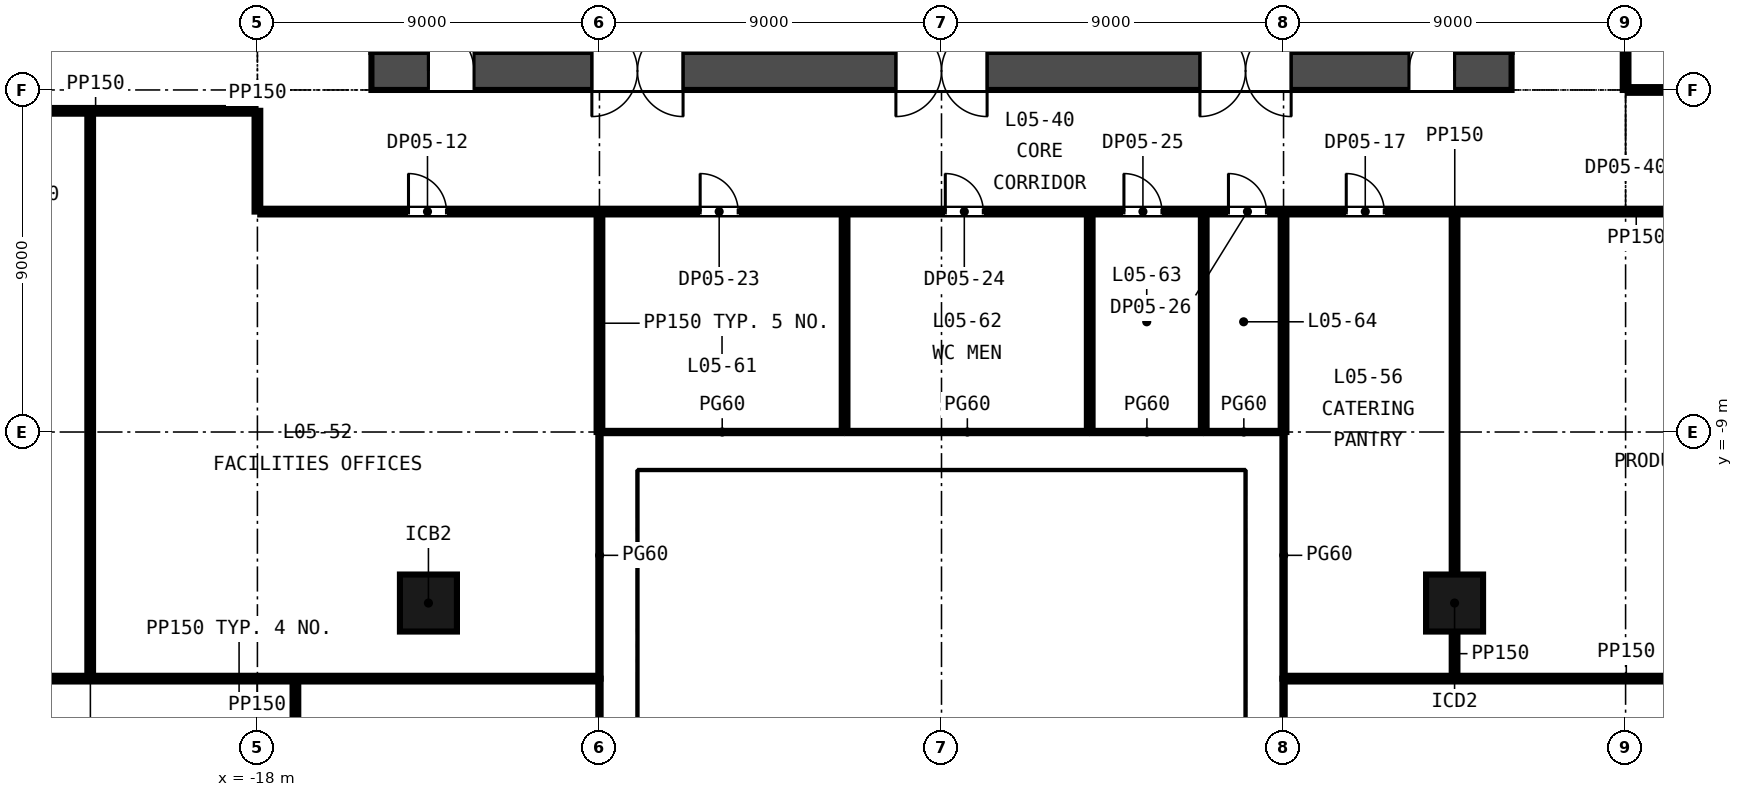
"""IFC4 building model, lengths in metres.
Left out: names, types, materials, properties, quantities, classifications, styles, units other than length and angle.
Written with IfcOpenShell. Run it as: python <this file> out.ifc"""

import sys

from ifc_helpers import new_model, si_unit, direction, frame, frame_2d, origin, origin_2d, place, context, subcontext, project, spatial, rectangle, extrude, element, fill, save


model = new_model("IFC4")
c1 = context("Model", 3, precision=1e-05, world=origin(), true_north=direction((0.0, 1.0)))
c2 = subcontext(c1, "Body", "Model", "MODEL_VIEW")
j1 = project(units=[si_unit("LENGTHUNIT", "METRE"), si_unit("PLANEANGLEUNIT", "RADIAN")], contexts=[c1])
p1 = place(None, origin())
s1 = spatial("IfcSite", under=j1, at=p1, CompositionType="ELEMENT")
p2 = place(p1, origin())
s2 = spatial("IfcBuilding", under=s1, at=p2, CompositionType="ELEMENT")
p3 = place(p2, frame((0.0, 0.0, 31.5)))
s3 = spatial("IfcBuildingStorey", under=s2, at=p3, CompositionType="ELEMENT", Elevation=31.5)
p4 = place(p3, frame((-15.0, 0.5, -0.3), z_axis=(0.0, 0.0, 1.0), x_axis=(1.0, 0.0, 0.0)))
e1 = element("IfcWall", 1, at=p4, inside=s3, PredefinedType="SOLIDWALL", context=c2, shape_type="SweptSolid", body=[
    extrude(rectangle(XDim=30.0, YDim=1.0, at=frame_2d((15.0, 0.0))), origin(), (0.0, 0.0, 1.0), 4.65),
])
p5 = place(p4, frame((5.8, 0.0, 0.3)))
e2 = element("IfcOpeningElement", 2, at=p5, cuts=e1, PredefinedType="OPENING", context=c2, shape_type="SweptSolid", body=[
    extrude(rectangle(XDim=2.4, YDim=2.4, at=frame_2d((1.2, 1.2))), frame((0.0, 0.51, 0.0), z_axis=(0.0, -1.0, 0.0), x_axis=(1.0, 0.0, 0.0)), (0.0, 0.0, 1.0), 1.02),
])
p6 = place(p4, frame((13.8, 0.0, 0.3)))
e3 = element("IfcOpeningElement", 3, at=p6, cuts=e1, PredefinedType="OPENING", context=c2, shape_type="SweptSolid", body=[
    extrude(rectangle(XDim=2.4, YDim=2.4, at=frame_2d((1.2, 1.2))), frame((0.0, 0.51, 0.0), z_axis=(0.0, -1.0, 0.0), x_axis=(1.0, 0.0, 0.0)), (0.0, 0.0, 1.0), 1.02),
])
p7 = place(p4, frame((21.8, 0.0, 0.3)))
e4 = element("IfcOpeningElement", 4, at=p7, cuts=e1, PredefinedType="OPENING", context=c2, shape_type="SweptSolid", body=[
    extrude(rectangle(XDim=2.4, YDim=2.4, at=frame_2d((1.2, 1.2))), frame((0.0, 0.51, 0.0), z_axis=(0.0, -1.0, 0.0), x_axis=(1.0, 0.0, 0.0)), (0.0, 0.0, 1.0), 1.02),
])
p8 = place(p4, frame((1.5, 0.0, 0.3)))
e5 = element("IfcOpeningElement", 5, at=p8, cuts=e1, PredefinedType="OPENING", context=c2, shape_type="SweptSolid", body=[
    extrude(rectangle(XDim=1.2, YDim=2.1, at=frame_2d((0.6, 1.05))), frame((0.0, 0.51, 0.0), z_axis=(0.0, -1.0, 0.0), x_axis=(1.0, 0.0, 0.0)), (0.0, 0.0, 1.0), 1.02),
])
p9 = place(p4, frame((27.3, 0.0, 0.3)))
e6 = element("IfcOpeningElement", 6, at=p9, cuts=e1, PredefinedType="OPENING", context=c2, shape_type="SweptSolid", body=[
    extrude(rectangle(XDim=1.2, YDim=2.1, at=frame_2d((0.6, 1.05))), frame((0.0, 0.51, 0.0), z_axis=(0.0, -1.0, 0.0), x_axis=(1.0, 0.0, 0.0)), (0.0, 0.0, 1.0), 1.02),
])
for number, where, z_axis, x_axis in (
    (7, (-13.5, -13.5, -0.3), (0.0, 0.0, 1.0), (1.0, 0.0, 0.0)),
    (8, (13.5, -13.5, -0.3), (0.0, 0.0, 1.0), (1.0, 0.0, 0.0)),
):
    element("IfcColumn", number, at=place(p3, frame(where, z_axis=z_axis, x_axis=x_axis)), inside=s3, PredefinedType="COLUMN", context=c2, shape_type="SweptSolid", body=[
        extrude(rectangle(XDim=1.5, YDim=1.5, at=origin_2d()), origin(), (0.0, 0.0, 1.0), 4.65),
    ])
for number, where, z_axis, x_axis in (
    (9, (-26.998, -15.489, 0.0), (0.0, 0.0, 1.0), (1.0, 0.0, 0.0)),
    (10, (9.03, -15.489, 0.0), (0.0, 0.0, 1.0), (1.0, 0.0, 0.0)),
):
    element("IfcWall", number, at=place(p3, frame(where, z_axis=z_axis, x_axis=x_axis)), inside=s3, PredefinedType="PARTITIONING", context=c2, shape_type="SweptSolid", body=[
        extrude(rectangle(XDim=17.968, YDim=0.15, at=frame_2d((8.984, 0.0))), origin(), (0.0, 0.0, 1.0), 4.35),
    ])
for number, where, z_axis, x_axis in (
    (11, (-8.925, -9.0, 0.0), (0.0, 0.0, 1.0), (1.0, 0.0, 0.0)),
    (12, (-2.475, -9.0, 0.0), (0.0, 0.0, 1.0), (1.0, 0.0, 0.0)),
):
    element("IfcWall", number, at=place(p3, frame(where, z_axis=z_axis, x_axis=x_axis)), inside=s3, PredefinedType="PARTITIONING", context=c2, shape_type="SweptSolid", body=[
        extrude(rectangle(XDim=6.3, YDim=0.06, at=frame_2d((3.15, 0.0))), origin(), (0.0, 0.0, 1.0), 4.35),
    ])
p10 = place(p3, frame((3.975, -9.0, 0.0), z_axis=(0.0, 0.0, 1.0), x_axis=(1.0, 0.0, 0.0)))
e13 = element("IfcWall", 13, at=p10, inside=s3, PredefinedType="PARTITIONING", context=c2, shape_type="SweptSolid", body=[
    extrude(rectangle(XDim=2.85, YDim=0.06, at=frame_2d((1.425, 0.0))), origin(), (0.0, 0.0, 1.0), 4.35),
])
p11 = place(p3, frame((6.975, -9.0, 0.0), z_axis=(0.0, 0.0, 1.0), x_axis=(1.0, 0.0, 0.0)))
e14 = element("IfcWall", 14, at=p11, inside=s3, PredefinedType="PARTITIONING", context=c2, shape_type="SweptSolid", body=[
    extrude(rectangle(XDim=1.95, YDim=0.06, at=frame_2d((0.975, 0.0))), origin(), (0.0, 0.0, 1.0), 4.35),
])
p12 = place(p3, frame((-17.925, -3.2, 0.0), z_axis=(0.0, 0.0, 1.0), x_axis=(1.0, 0.0, 0.0)))
e15 = element("IfcWall", 15, at=p12, inside=s3, PredefinedType="PARTITIONING", context=c2, shape_type="SweptSolid", body=[
    extrude(rectangle(XDim=50.906, YDim=0.15, at=frame_2d((25.453, 0.0))), origin(), (0.0, 0.0, 1.0), 4.35),
])
p13 = place(p12, frame((3.9, 0.0, 0.0)))
e16 = element("IfcOpeningElement", 16, at=p13, cuts=e15, PredefinedType="OPENING", context=c2, shape_type="SweptSolid", body=[
    extrude(rectangle(XDim=1.0, YDim=2.1, at=frame_2d((0.5, 1.05))), frame((0.0, 0.085, 0.0), z_axis=(0.0, -1.0, 0.0), x_axis=(1.0, 0.0, 0.0)), (0.0, 0.0, 1.0), 0.17),
])
p14 = place(p12, frame((28.575, 0.0, 0.0)))
e17 = element("IfcOpeningElement", 17, at=p14, cuts=e15, PredefinedType="OPENING", context=c2, shape_type="SweptSolid", body=[
    extrude(rectangle(XDim=1.0, YDim=2.1, at=frame_2d((0.5, 1.05))), frame((0.0, 0.085, 0.0), z_axis=(0.0, -1.0, 0.0), x_axis=(1.0, 0.0, 0.0)), (0.0, 0.0, 1.0), 0.17),
])
p15 = place(p12, frame((42.825, 0.0, 0.0)))
e18 = element("IfcOpeningElement", 18, at=p15, cuts=e15, PredefinedType="OPENING", context=c2, shape_type="SweptSolid", body=[
    extrude(rectangle(XDim=1.0, YDim=2.1, at=frame_2d((0.5, 1.05))), frame((0.0, 0.085, 0.0), z_axis=(0.0, -1.0, 0.0), x_axis=(1.0, 0.0, 0.0)), (0.0, 0.0, 1.0), 0.17),
])
p16 = place(p12, frame((11.575, 0.0, 0.0)))
e19 = element("IfcOpeningElement", 19, at=p16, cuts=e15, PredefinedType="OPENING", context=c2, shape_type="SweptSolid", body=[
    extrude(rectangle(XDim=1.0, YDim=2.1, at=frame_2d((0.5, 1.05))), frame((0.0, 0.085, 0.0), z_axis=(0.0, -1.0, 0.0), x_axis=(1.0, 0.0, 0.0)), (0.0, 0.0, 1.0), 0.17),
])
p17 = place(p12, frame((18.025, 0.0, 0.0)))
e20 = element("IfcOpeningElement", 20, at=p17, cuts=e15, PredefinedType="OPENING", context=c2, shape_type="SweptSolid", body=[
    extrude(rectangle(XDim=1.0, YDim=2.1, at=frame_2d((0.5, 1.05))), frame((0.0, 0.085, 0.0), z_axis=(0.0, -1.0, 0.0), x_axis=(1.0, 0.0, 0.0)), (0.0, 0.0, 1.0), 0.17),
])
p18 = place(p12, frame((22.725, 0.0, 0.0)))
e21 = element("IfcOpeningElement", 21, at=p18, cuts=e15, PredefinedType="OPENING", context=c2, shape_type="SweptSolid", body=[
    extrude(rectangle(XDim=1.0, YDim=2.1, at=frame_2d((0.5, 1.05))), frame((0.0, 0.085, 0.0), z_axis=(0.0, -1.0, 0.0), x_axis=(1.0, 0.0, 0.0)), (0.0, 0.0, 1.0), 0.17),
])
p19 = place(p12, frame((25.475, 0.0, 0.0)))
e22 = element("IfcOpeningElement", 22, at=p19, cuts=e15, PredefinedType="OPENING", context=c2, shape_type="SweptSolid", body=[
    extrude(rectangle(XDim=1.0, YDim=2.1, at=frame_2d((0.5, 1.05))), frame((0.0, 0.085, 0.0), z_axis=(0.0, -1.0, 0.0), x_axis=(1.0, 0.0, 0.0)), (0.0, 0.0, 1.0), 0.17),
])
p20 = place(p3, frame((-31.859, -0.549, 0.0), z_axis=(0.0, 0.0, 1.0), x_axis=(1.0, 0.0, 0.0)))
e23 = element("IfcWall", 23, at=p20, inside=s3, PredefinedType="PARTITIONING", context=c2, shape_type="SweptSolid", body=[
    extrude(rectangle(XDim=13.784, YDim=0.15, at=frame_2d((6.892, 0.0))), origin(), (0.0, 0.0, 1.0), 4.35),
])
p21 = place(p20, frame((4.359, 0.0, 0.0)))
e24 = element("IfcOpeningElement", 24, at=p21, cuts=e23, PredefinedType="OPENING", context=c2, shape_type="SweptSolid", body=[
    extrude(rectangle(XDim=1.0, YDim=2.1, at=frame_2d((0.5, 1.05))), frame((0.0, 0.085, 0.0), z_axis=(0.0, -1.0, 0.0), x_axis=(1.0, 0.0, 0.0)), (0.0, 0.0, 1.0), 0.17),
])
p22 = place(p3, frame((18.075, 0.0, 0.0), z_axis=(0.0, 0.0, 1.0), x_axis=(1.0, 0.0, 0.0)))
e25 = element("IfcWall", 25, at=p22, inside=s3, PredefinedType="PARTITIONING", context=c2, shape_type="SweptSolid", body=[
    extrude(rectangle(XDim=17.865, YDim=0.15, at=frame_2d((8.933, 0.0))), origin(), (0.0, 0.0, 1.0), 4.35),
])
p23 = place(p22, frame((15.325, 0.0, 0.0)))
e26 = element("IfcOpeningElement", 26, at=p23, cuts=e25, PredefinedType="OPENING", context=c2, shape_type="SweptSolid", body=[
    extrude(rectangle(XDim=1.0, YDim=2.1, at=frame_2d((0.5, 1.05))), frame((0.0, 0.085, 0.0), z_axis=(0.0, -1.0, 0.0), x_axis=(1.0, 0.0, 0.0)), (0.0, 0.0, 1.0), 0.17),
])
p24 = place(p3, frame((-22.4, -15.414, 0.0), z_axis=(0.0, 0.0, 1.0), x_axis=(0.0, 1.0, 0.0)))
e27 = element("IfcWall", 27, at=p24, inside=s3, PredefinedType="PARTITIONING", context=c2, shape_type="SweptSolid", body=[
    extrude(rectangle(XDim=14.79, YDim=0.15, at=frame_2d((7.395, 0.0))), origin(), (0.0, 0.0, 1.0), 4.35),
])
p25 = place(p3, frame((-18.0, -3.2, 0.0), z_axis=(0.0, 0.0, 1.0), x_axis=(0.0, 1.0, 0.0)))
e28 = element("IfcWall", 28, at=p25, inside=s3, PredefinedType="PARTITIONING", context=c2, shape_type="SweptSolid", body=[
    extrude(rectangle(XDim=2.651, YDim=0.15, at=frame_2d((1.326, 0.0))), origin(), (0.0, 0.0, 1.0), 4.35),
])
p26 = place(p3, frame((-17.0, -27.704, 0.0), z_axis=(0.0, 0.0, 1.0), x_axis=(0.0, 1.0, 0.0)))
e29 = element("IfcWall", 29, at=p26, inside=s3, PredefinedType="PARTITIONING", context=c2, shape_type="SweptSolid", body=[
    extrude(rectangle(XDim=12.14, YDim=0.15, at=frame_2d((6.07, 0.0))), origin(), (0.0, 0.0, 1.0), 4.35),
])
p27 = place(p3, frame((-9.0, -27.778, 0.0), z_axis=(0.0, 0.0, 1.0), x_axis=(0.0, 1.0, 0.0)))
e30 = element("IfcWall", 30, at=p27, inside=s3, PredefinedType="PARTITIONING", context=c2, shape_type="SweptSolid", body=[
    extrude(rectangle(XDim=12.288, YDim=0.06, at=frame_2d((6.144, 0.0))), origin(), (0.0, 0.0, 1.0), 4.35),
])
p28 = place(p3, frame((-9.0, -15.489, 0.0), z_axis=(0.0, 0.0, 1.0), x_axis=(0.0, 1.0, 0.0)))
e31 = element("IfcWall", 31, at=p28, inside=s3, PredefinedType="PARTITIONING", context=c2, shape_type="SweptSolid", body=[
    extrude(rectangle(XDim=6.488, YDim=0.06, at=frame_2d((3.244, 0.0))), origin(), (0.0, 0.0, 1.0), 4.35),
])
for number, where, z_axis, x_axis in (
    (32, (-9.0, -9.0, 0.0), (0.0, 0.0, 1.0), (0.0, 1.0, 0.0)),
    (33, (-2.55, -9.0, 0.0), (0.0, 0.0, 1.0), (0.0, 1.0, 0.0)),
    (34, (3.9, -9.0, 0.0), (0.0, 0.0, 1.0), (0.0, 1.0, 0.0)),
    (35, (6.9, -9.0, 0.0), (0.0, 0.0, 1.0), (0.0, 1.0, 0.0)),
):
    element("IfcWall", number, at=place(p3, frame(where, z_axis=z_axis, x_axis=x_axis)), inside=s3, PredefinedType="PARTITIONING", context=c2, shape_type="SweptSolid", body=[
        extrude(rectangle(XDim=5.725, YDim=0.15, at=frame_2d((2.863, 0.0))), origin(), (0.0, 0.0, 1.0), 4.35),
    ])
p29 = place(p3, frame((9.0, -23.953, 0.0), z_axis=(0.0, 0.0, 1.0), x_axis=(0.0, 1.0, 0.0)))
e36 = element("IfcWall", 36, at=p29, inside=s3, PredefinedType="PARTITIONING", context=c2, shape_type="SweptSolid", body=[
    extrude(rectangle(XDim=8.462, YDim=0.06, at=frame_2d((4.231, 0.0))), origin(), (0.0, 0.0, 1.0), 4.35),
])
p30 = place(p3, frame((9.0, -15.489, 0.0), z_axis=(0.0, 0.0, 1.0), x_axis=(0.0, 1.0, 0.0)))
e37 = element("IfcWall", 37, at=p30, inside=s3, PredefinedType="PARTITIONING", context=c2, shape_type="SweptSolid", body=[
    extrude(rectangle(XDim=6.488, YDim=0.06, at=frame_2d((3.244, 0.0))), origin(), (0.0, 0.0, 1.0), 4.35),
])
p31 = place(p3, frame((9.0, -9.0, 0.0), z_axis=(0.0, 0.0, 1.0), x_axis=(0.0, 1.0, 0.0)))
e38 = element("IfcWall", 38, at=p31, inside=s3, PredefinedType="PARTITIONING", context=c2, shape_type="SweptSolid", body=[
    extrude(rectangle(XDim=5.725, YDim=0.15, at=frame_2d((2.863, 0.0))), origin(), (0.0, 0.0, 1.0), 4.35),
])
p32 = place(p3, frame((13.5, -15.414, 0.0), z_axis=(0.0, 0.0, 1.0), x_axis=(0.0, 1.0, 0.0)))
e39 = element("IfcWall", 39, at=p32, inside=s3, PredefinedType="PARTITIONING", context=c2, shape_type="SweptSolid", body=[
    extrude(rectangle(XDim=1.164, YDim=0.15, at=frame_2d((0.582, 0.0))), origin(), (0.0, 0.0, 1.0), 3.591),
])
p33 = place(p3, frame((13.5, -12.75, 0.0), z_axis=(0.0, 0.0, 1.0), x_axis=(0.0, 1.0, 0.0)))
e40 = element("IfcWall", 40, at=p33, inside=s3, PredefinedType="PARTITIONING", context=c2, shape_type="SweptSolid", body=[
    extrude(rectangle(XDim=9.475, YDim=0.15, at=frame_2d((4.738, 0.0))), origin(), (0.0, 0.0, 1.0), 3.601),
])
p34 = place(p3, frame((18.0, 0.0, 0.0), z_axis=(0.0, 0.0, 1.0), x_axis=(0.0, 1.0, 0.0)))
e41 = element("IfcWall", 41, at=p34, inside=s3, PredefinedType="PARTITIONING", context=c2, shape_type="SweptSolid", body=[
    extrude(rectangle(XDim=14.25, YDim=0.15, at=frame_2d((7.125, 0.0))), origin(), (0.0, 0.0, 1.0), 4.35),
])
p35 = place(p34, frame((6.65, 0.0, 0.0)))
e42 = element("IfcOpeningElement", 42, at=p35, cuts=e41, PredefinedType="OPENING", context=c2, shape_type="SweptSolid", body=[
    extrude(rectangle(XDim=1.0, YDim=2.1, at=frame_2d((0.5, 1.05))), frame((0.0, 0.085, 0.0), z_axis=(0.0, -1.0, 0.0), x_axis=(1.0, 0.0, 0.0)), (0.0, 0.0, 1.0), 0.17),
])
p36 = place(p5, origin())
e43 = element("IfcDoor", 43, at=p36, inside=s3, OperationType="DOUBLE_DOOR_DOUBLE_SWING", PredefinedType="DOOR", context=c2, shape_type="SweptSolid", body=[
    extrude(rectangle(XDim=2.4, YDim=2.4, at=frame_2d((1.2, 1.2))), frame((0.0, 0.025, 0.0), z_axis=(0.0, -1.0, 0.0), x_axis=(1.0, 0.0, 0.0)), (0.0, 0.0, 1.0), 0.05),
])
fill(e2, e43)
p37 = place(p6, origin())
e44 = element("IfcDoor", 44, at=p37, inside=s3, OperationType="DOUBLE_DOOR_DOUBLE_SWING", PredefinedType="DOOR", context=c2, shape_type="SweptSolid", body=[
    extrude(rectangle(XDim=2.4, YDim=2.4, at=frame_2d((1.2, 1.2))), frame((0.0, 0.025, 0.0), z_axis=(0.0, -1.0, 0.0), x_axis=(1.0, 0.0, 0.0)), (0.0, 0.0, 1.0), 0.05),
])
fill(e3, e44)
p38 = place(p7, origin())
e45 = element("IfcDoor", 45, at=p38, inside=s3, OperationType="DOUBLE_DOOR_DOUBLE_SWING", PredefinedType="DOOR", context=c2, shape_type="SweptSolid", body=[
    extrude(rectangle(XDim=2.4, YDim=2.4, at=frame_2d((1.2, 1.2))), frame((0.0, 0.025, 0.0), z_axis=(0.0, -1.0, 0.0), x_axis=(1.0, 0.0, 0.0)), (0.0, 0.0, 1.0), 0.05),
])
fill(e4, e45)
p39 = place(p8, origin())
e46 = element("IfcDoor", 46, at=p39, inside=s3, OperationType="SINGLE_SWING_LEFT", PredefinedType="DOOR", context=c2, shape_type="SweptSolid", body=[
    extrude(rectangle(XDim=1.2, YDim=2.1, at=frame_2d((0.6, 1.05))), frame((0.0, 0.025, 0.0), z_axis=(0.0, -1.0, 0.0), x_axis=(1.0, 0.0, 0.0)), (0.0, 0.0, 1.0), 0.05),
])
fill(e5, e46)
p40 = place(p9, origin())
e47 = element("IfcDoor", 47, at=p40, inside=s3, OperationType="SINGLE_SWING_RIGHT", PredefinedType="DOOR", context=c2, shape_type="SweptSolid", body=[
    extrude(rectangle(XDim=1.2, YDim=2.1, at=frame_2d((0.6, 1.05))), frame((0.0, 0.025, 0.0), z_axis=(0.0, -1.0, 0.0), x_axis=(1.0, 0.0, 0.0)), (0.0, 0.0, 1.0), 0.05),
])
fill(e6, e47)
p41 = place(p13, origin())
e48 = element("IfcDoor", 48, at=p41, inside=s3, OperationType="SINGLE_SWING_LEFT", PredefinedType="DOOR", context=c2, shape_type="SweptSolid", body=[
    extrude(rectangle(XDim=1.0, YDim=2.1, at=frame_2d((0.5, 1.05))), frame((0.0, 0.025, 0.0), z_axis=(0.0, -1.0, 0.0), x_axis=(1.0, 0.0, 0.0)), (0.0, 0.0, 1.0), 0.05),
])
fill(e16, e48)
p42 = place(p14, origin())
e49 = element("IfcDoor", 49, at=p42, inside=s3, OperationType="SINGLE_SWING_LEFT", PredefinedType="DOOR", context=c2, shape_type="SweptSolid", body=[
    extrude(rectangle(XDim=1.0, YDim=2.1, at=frame_2d((0.5, 1.05))), frame((0.0, 0.025, 0.0), z_axis=(0.0, -1.0, 0.0), x_axis=(1.0, 0.0, 0.0)), (0.0, 0.0, 1.0), 0.05),
])
fill(e17, e49)
p43 = place(p16, origin())
e50 = element("IfcDoor", 50, at=p43, inside=s3, OperationType="SINGLE_SWING_LEFT", PredefinedType="DOOR", context=c2, shape_type="SweptSolid", body=[
    extrude(rectangle(XDim=1.0, YDim=2.1, at=frame_2d((0.5, 1.05))), frame((0.0, 0.025, 0.0), z_axis=(0.0, -1.0, 0.0), x_axis=(1.0, 0.0, 0.0)), (0.0, 0.0, 1.0), 0.05),
])
fill(e19, e50)
p44 = place(p17, origin())
e51 = element("IfcDoor", 51, at=p44, inside=s3, OperationType="SINGLE_SWING_LEFT", PredefinedType="DOOR", context=c2, shape_type="SweptSolid", body=[
    extrude(rectangle(XDim=1.0, YDim=2.1, at=frame_2d((0.5, 1.05))), frame((0.0, 0.025, 0.0), z_axis=(0.0, -1.0, 0.0), x_axis=(1.0, 0.0, 0.0)), (0.0, 0.0, 1.0), 0.05),
])
fill(e20, e51)
p45 = place(p18, origin())
e52 = element("IfcDoor", 52, at=p45, inside=s3, OperationType="SINGLE_SWING_LEFT", PredefinedType="DOOR", context=c2, shape_type="SweptSolid", body=[
    extrude(rectangle(XDim=1.0, YDim=2.1, at=frame_2d((0.5, 1.05))), frame((0.0, 0.025, 0.0), z_axis=(0.0, -1.0, 0.0), x_axis=(1.0, 0.0, 0.0)), (0.0, 0.0, 1.0), 0.05),
])
fill(e21, e52)
p46 = place(p19, origin())
e53 = element("IfcDoor", 53, at=p46, inside=s3, OperationType="SINGLE_SWING_LEFT", PredefinedType="DOOR", context=c2, shape_type="SweptSolid", body=[
    extrude(rectangle(XDim=1.0, YDim=2.1, at=frame_2d((0.5, 1.05))), frame((0.0, 0.025, 0.0), z_axis=(0.0, -1.0, 0.0), x_axis=(1.0, 0.0, 0.0)), (0.0, 0.0, 1.0), 0.05),
])
fill(e22, e53)
save(model, sys.argv[1])
